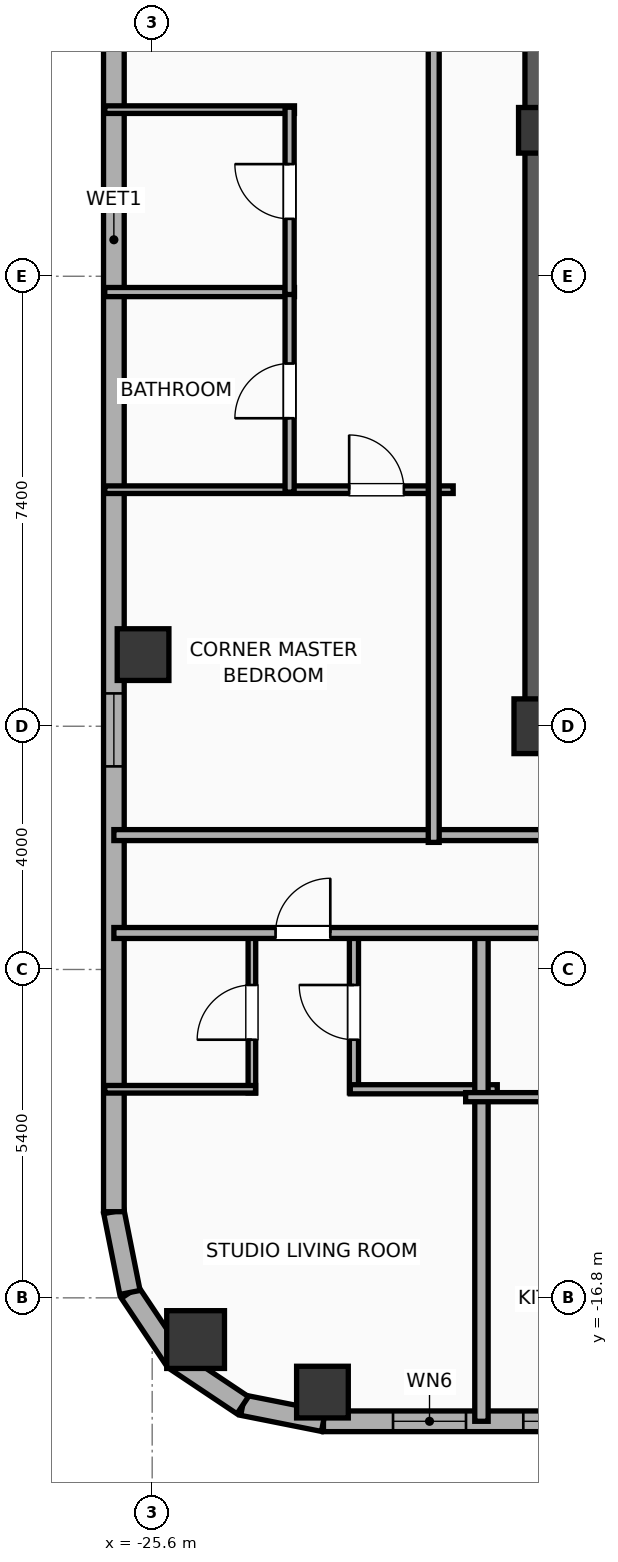
"""IFC4 building model, lengths in metres.
Left out: names, types, materials, properties, quantities, classifications, styles, units other than length and angle.
Written with IfcOpenShell. Run it as: python <this file> out.ifc"""

import sys

from ifc_helpers import new_model, si_unit, direction, frame, frame_2d, origin, origin_2d, place, context, subcontext, project, spatial, rectangle, hollow_rectangle, hollow_circle, extrude, element, fill, save


model = new_model("IFC4")
c1 = context("Model", 3, precision=1e-05, world=origin(), true_north=direction((0.0, 1.0)))
c2 = subcontext(c1, "Body", "Model", "MODEL_VIEW")
j1 = project(units=[si_unit("LENGTHUNIT", "METRE"), si_unit("PLANEANGLEUNIT", "RADIAN")], contexts=[c1])
p1 = place(None, origin())
s1 = spatial("IfcSite", under=j1, at=p1, CompositionType="ELEMENT")
p2 = place(p1, origin())
s2 = spatial("IfcBuilding", under=s1, at=p2, CompositionType="ELEMENT")
p3 = place(p2, frame((0.0, 0.0, 215.8)))
s3 = spatial("IfcBuildingStorey", under=s2, at=p3, CompositionType="ELEMENT", Elevation=215.8)
p4 = place(p3, frame((-19.2, -7.4, 0.0), z_axis=(0.0, 0.0, 1.0), x_axis=(1.0, 0.0, 0.0)))
e1 = element("IfcColumn", 1, at=p4, inside=s3, PredefinedType="COLUMN", context=c2, shape_type="SweptSolid", body=[
    extrude(rectangle(XDim=0.9, YDim=0.9, at=origin_2d()), origin(), (0.0, 0.0, 1.0), 3.9),
])
p5 = place(p3, frame((-19.2, 2.4, 0.0), z_axis=(0.0, 0.0, 1.0), x_axis=(1.0, 0.0, 0.0)))
e2 = element("IfcColumn", 2, at=p5, inside=s3, PredefinedType="COLUMN", context=c2, shape_type="SweptSolid", body=[
    extrude(rectangle(XDim=0.75, YDim=0.75, at=origin_2d()), origin(), (0.0, 0.0, 1.0), 3.9),
])
p6 = place(p3, frame((-19.425, -7.4, 0.0), z_axis=(0.0, 0.0, 1.0), x_axis=(1.0, 0.0, 0.0)))
e3 = element("IfcWall", 3, at=p6, inside=s3, PredefinedType="SHEAR", context=c2, shape_type="SweptSolid", body=[
    extrude(rectangle(XDim=7.25, YDim=0.45, at=frame_2d((3.625, 0.0))), origin(), (0.0, 0.0, 1.0), 3.65),
])
p7 = place(p3, frame((-19.145, -7.4, 0.0), z_axis=(0.0, 0.0, 1.0), x_axis=(0.0, 1.0, 0.0)))
e4 = element("IfcWall", 4, at=p7, inside=s3, PredefinedType="SHEAR", context=c2, shape_type="SweptSolid", body=[
    extrude(rectangle(XDim=14.8, YDim=0.65, at=frame_2d((7.4, 0.0))), origin(), (0.0, 0.0, 1.0), 3.65),
])
for number, where, z_axis, x_axis in (
    (5, (-22.8, -18.35, 0.0), (0.0, 0.0, 1.0), (1.0, 0.0, 0.0)),
    (6, (-25.75, -6.222, 0.0), (0.0, 0.0, 1.0), (1.0, 0.0, 0.0)),
):
    element("IfcColumn", number, at=place(p3, frame(where, z_axis=z_axis, x_axis=x_axis)), inside=s3, PredefinedType="COLUMN", context=c2, shape_type="SweptSolid", body=[
        extrude(hollow_rectangle(XDim=0.85, YDim=0.85, WallThickness=0.028, at=origin_2d()), origin(), (0.0, 0.0, 1.0), 3.9),
    ])
p8 = place(p3, frame((-24.886, -17.486, 0.0), z_axis=(0.0, 0.0, 1.0), x_axis=(1.0, 0.0, 0.0)))
e7 = element("IfcColumn", 7, at=p8, inside=s3, PredefinedType="COLUMN", context=c2, shape_type="SweptSolid", body=[
    extrude(hollow_circle(Radius=0.475, WallThickness=0.032, at=origin_2d()), origin(), (0.0, 0.0, 1.0), 3.9),
])
p9 = place(p3, frame((26.783, -18.83, 0.0), z_axis=(0.0, 0.0, 1.0), x_axis=(-1.0, 0.0, 0.0)))
e8 = element("IfcWall", 8, at=p9, inside=s3, PredefinedType="ELEMENTEDWALL", context=c2, shape_type="SweptSolid", body=[
    extrude(rectangle(XDim=49.566, YDim=0.34, at=frame_2d((24.783, 0.0))), origin(), (0.0, 0.0, 1.0), 3.65),
])
p10 = place(p9, frame((23.583, 0.0, 0.75)))
e9 = element("IfcOpeningElement", 9, at=p10, cuts=e8, PredefinedType="OPENING", context=c2, shape_type="SweptSolid", body=[
    extrude(rectangle(XDim=2.4, YDim=2.1, at=frame_2d((1.2, 1.05))), frame((0.0, 0.18, 0.0), z_axis=(0.0, -1.0, 0.0), x_axis=(1.0, 0.0, 0.0)), (0.0, 0.0, 1.0), 0.36),
])
p11 = place(p9, frame((41.756, 0.0, 0.75)))
e10 = element("IfcOpeningElement", 10, at=p11, cuts=e8, PredefinedType="OPENING", context=c2, shape_type="SweptSolid", body=[
    extrude(rectangle(XDim=2.4, YDim=2.1, at=frame_2d((1.2, 1.05))), frame((0.0, 0.18, 0.0), z_axis=(0.0, -1.0, 0.0), x_axis=(1.0, 0.0, 0.0)), (0.0, 0.0, 1.0), 0.36),
])
p12 = place(p9, frame((47.222, 0.0, 0.75)))
e11 = element("IfcOpeningElement", 11, at=p12, cuts=e8, PredefinedType="OPENING", context=c2, shape_type="SweptSolid", body=[
    extrude(rectangle(XDim=1.2, YDim=2.05, at=frame_2d((0.6, 1.025))), frame((0.0, 0.18, 0.0), z_axis=(0.0, -1.0, 0.0), x_axis=(1.0, 0.0, 0.0)), (0.0, 0.0, 1.0), 0.36),
])
p13 = place(p9, frame((45.08, 0.0, 0.75)))
e12 = element("IfcOpeningElement", 12, at=p13, cuts=e8, PredefinedType="OPENING", context=c2, shape_type="SweptSolid", body=[
    extrude(rectangle(XDim=1.2, YDim=2.05, at=frame_2d((0.6, 1.025))), frame((0.0, 0.18, 0.0), z_axis=(0.0, -1.0, 0.0), x_axis=(1.0, 0.0, 0.0)), (0.0, 0.0, 1.0), 0.36),
])
p14 = place(p9, frame((37.289, 0.0, 0.75)))
e13 = element("IfcOpeningElement", 13, at=p14, cuts=e8, PredefinedType="OPENING", context=c2, shape_type="SweptSolid", body=[
    extrude(rectangle(XDim=1.2, YDim=2.05, at=frame_2d((0.6, 1.025))), frame((0.0, 0.18, 0.0), z_axis=(0.0, -1.0, 0.0), x_axis=(1.0, 0.0, 0.0)), (0.0, 0.0, 1.0), 0.36),
])
p15 = place(p9, frame((16.115, 0.0, 0.75)))
e14 = element("IfcOpeningElement", 14, at=p15, cuts=e8, PredefinedType="OPENING", context=c2, shape_type="SweptSolid", body=[
    extrude(rectangle(XDim=1.2, YDim=2.05, at=frame_2d((0.6, 1.025))), frame((0.0, 0.18, 0.0), z_axis=(0.0, -1.0, 0.0), x_axis=(1.0, 0.0, 0.0)), (0.0, 0.0, 1.0), 0.36),
])
p16 = place(p9, frame((12.422, 0.0, 0.75)))
e15 = element("IfcOpeningElement", 15, at=p16, cuts=e8, PredefinedType="OPENING", context=c2, shape_type="SweptSolid", body=[
    extrude(rectangle(XDim=1.2, YDim=2.05, at=frame_2d((0.6, 1.025))), frame((0.0, 0.18, 0.0), z_axis=(0.0, -1.0, 0.0), x_axis=(1.0, 0.0, 0.0)), (0.0, 0.0, 1.0), 0.36),
])
p17 = place(p9, frame((8.09, 0.0, 0.75)))
e16 = element("IfcOpeningElement", 16, at=p17, cuts=e8, PredefinedType="OPENING", context=c2, shape_type="SweptSolid", body=[
    extrude(rectangle(XDim=1.2, YDim=2.05, at=frame_2d((0.6, 1.025))), frame((0.0, 0.18, 0.0), z_axis=(0.0, -1.0, 0.0), x_axis=(1.0, 0.0, 0.0)), (0.0, 0.0, 1.0), 0.36),
])
p18 = place(p9, frame((4.637, 0.0, 0.75)))
e17 = element("IfcOpeningElement", 17, at=p18, cuts=e8, PredefinedType="OPENING", context=c2, shape_type="SweptSolid", body=[
    extrude(rectangle(XDim=1.2, YDim=2.05, at=frame_2d((0.6, 1.025))), frame((0.0, 0.18, 0.0), z_axis=(0.0, -1.0, 0.0), x_axis=(1.0, 0.0, 0.0)), (0.0, 0.0, 1.0), 0.36),
])
p19 = place(p9, frame((1.811, 0.0, 0.75)))
e18 = element("IfcOpeningElement", 18, at=p19, cuts=e8, PredefinedType="OPENING", context=c2, shape_type="SweptSolid", body=[
    extrude(rectangle(XDim=1.2, YDim=2.05, at=frame_2d((0.6, 1.025))), frame((0.0, 0.18, 0.0), z_axis=(0.0, -1.0, 0.0), x_axis=(1.0, 0.0, 0.0)), (0.0, 0.0, 1.0), 0.36),
])
p20 = place(p9, frame((32.253, 0.0, 0.75)))
e19 = element("IfcOpeningElement", 19, at=p20, cuts=e8, PredefinedType="OPENING", context=c2, shape_type="SweptSolid", body=[
    extrude(rectangle(XDim=1.2, YDim=2.05, at=frame_2d((0.6, 1.025))), frame((0.0, 0.18, 0.0), z_axis=(0.0, -1.0, 0.0), x_axis=(1.0, 0.0, 0.0)), (0.0, 0.0, 1.0), 0.36),
])
p21 = place(p9, frame((27.853, 0.0, 0.75)))
e20 = element("IfcOpeningElement", 20, at=p21, cuts=e8, PredefinedType="OPENING", context=c2, shape_type="SweptSolid", body=[
    extrude(rectangle(XDim=1.2, YDim=2.05, at=frame_2d((0.6, 1.025))), frame((0.0, 0.18, 0.0), z_axis=(0.0, -1.0, 0.0), x_axis=(1.0, 0.0, 0.0)), (0.0, 0.0, 1.0), 0.36),
])
p22 = place(p9, frame((20.473, 0.0, 0.75)))
e21 = element("IfcOpeningElement", 21, at=p22, cuts=e8, PredefinedType="OPENING", context=c2, shape_type="SweptSolid", body=[
    extrude(rectangle(XDim=1.2, YDim=2.05, at=frame_2d((0.6, 1.025))), frame((0.0, 0.18, 0.0), z_axis=(0.0, -1.0, 0.0), x_axis=(1.0, 0.0, 0.0)), (0.0, 0.0, 1.0), 0.36),
])
p23 = place(p3, frame((-22.783, -18.83, 0.0), z_axis=(0.0, 0.0, 1.0), x_axis=(-0.980788153188, 0.195075878998, 0.0)))
e22 = element("IfcWall", 22, at=p23, inside=s3, PredefinedType="ELEMENTEDWALL", context=c2, shape_type="SweptSolid", body=[
    extrude(rectangle(XDim=1.354, YDim=0.34, at=frame_2d((0.677, 0.0))), origin(), (0.0, 0.0, 1.0), 3.65),
])
p24 = place(p3, frame((-24.111, -18.566, 0.0), z_axis=(0.0, 0.0, 1.0), x_axis=(-0.831403586725, 0.555669034571, 0.0)))
e23 = element("IfcWall", 23, at=p24, inside=s3, PredefinedType="ELEMENTEDWALL", context=c2, shape_type="SweptSolid", body=[
    extrude(rectangle(XDim=1.337, YDim=0.34, at=frame_2d((0.668, 0.0))), origin(), (0.0, 0.0, 1.0), 3.65),
])
p25 = place(p3, frame((-25.223, -17.823, 0.0), z_axis=(0.0, 0.0, 1.0), x_axis=(-0.555584683399, 0.831459956686, 0.0)))
e24 = element("IfcWall", 24, at=p25, inside=s3, PredefinedType="ELEMENTEDWALL", context=c2, shape_type="SweptSolid", body=[
    extrude(rectangle(XDim=1.337, YDim=0.34, at=frame_2d((0.668, 0.0))), origin(), (0.0, 0.0, 1.0), 3.65),
])
p26 = place(p3, frame((-25.966, -16.711, 0.0), z_axis=(0.0, 0.0, 1.0), x_axis=(-0.195110379894, 0.98078129043, 0.0)))
e25 = element("IfcWall", 25, at=p26, inside=s3, PredefinedType="ELEMENTEDWALL", context=c2, shape_type="SweptSolid", body=[
    extrude(rectangle(XDim=1.354, YDim=0.34, at=frame_2d((0.677, 0.0))), origin(), (0.0, 0.0, 1.0), 3.65),
])
p27 = place(p3, frame((-26.23, -15.383, 0.0), z_axis=(0.0, 0.0, 1.0), x_axis=(0.0, 1.0, 0.0)))
e26 = element("IfcWall", 26, at=p27, inside=s3, PredefinedType="ELEMENTEDWALL", context=c2, shape_type="SweptSolid", body=[
    extrude(rectangle(XDim=31.967, YDim=0.34, at=frame_2d((15.983, 0.0))), origin(), (0.0, 0.0, 1.0), 3.65),
])
p28 = place(p27, frame((29.55, 0.0, 0.75)))
e27 = element("IfcOpeningElement", 27, at=p28, cuts=e26, PredefinedType="OPENING", context=c2, shape_type="SweptSolid", body=[
    extrude(rectangle(XDim=1.2, YDim=2.05, at=frame_2d((0.6, 1.025))), frame((0.0, 0.18, 0.0), z_axis=(0.0, -1.0, 0.0), x_axis=(1.0, 0.0, 0.0)), (0.0, 0.0, 1.0), 0.36),
])
p29 = place(p27, frame((20.778, 0.0, 0.75)))
e28 = element("IfcOpeningElement", 28, at=p29, cuts=e26, PredefinedType="OPENING", context=c2, shape_type="SweptSolid", body=[
    extrude(rectangle(XDim=1.2, YDim=2.05, at=frame_2d((0.6, 1.025))), frame((0.0, 0.18, 0.0), z_axis=(0.0, -1.0, 0.0), x_axis=(1.0, 0.0, 0.0)), (0.0, 0.0, 1.0), 0.36),
])
p30 = place(p27, frame((7.323, 0.0, 0.75)))
e29 = element("IfcOpeningElement", 29, at=p30, cuts=e26, PredefinedType="OPENING", context=c2, shape_type="SweptSolid", body=[
    extrude(rectangle(XDim=1.2, YDim=2.05, at=frame_2d((0.6, 1.025))), frame((0.0, 0.18, 0.0), z_axis=(0.0, -1.0, 0.0), x_axis=(1.0, 0.0, 0.0)), (0.0, 0.0, 1.0), 0.36),
])
p31 = place(p3, frame((-26.23, -9.19, 0.0), z_axis=(0.0, 0.0, 1.0), x_axis=(1.0, 0.0, 0.0)))
e30 = element("IfcWall", 30, at=p31, inside=s3, PredefinedType="PARTITIONING", context=c2, shape_type="SweptSolid", body=[
    extrude(rectangle(XDim=16.35, YDim=0.18, at=frame_2d((8.175, 0.0))), origin(), (0.0, 0.0, 1.0), 3.65),
])
p32 = place(p3, frame((-23.96, -13.43, 0.0), z_axis=(0.0, 0.0, 1.0), x_axis=(0.0, 1.0, 0.0)))
e31 = element("IfcWall", 31, at=p32, inside=s3, PredefinedType="PARTITIONING", context=c2, shape_type="SweptSolid", body=[
    extrude(rectangle(XDim=2.65, YDim=0.125, at=frame_2d((1.325, 0.0))), origin(), (0.0, 0.0, 1.0), 3.65),
])
p33 = place(p32, frame((0.875, 0.0, 0.0)))
e32 = element("IfcOpeningElement", 32, at=p33, cuts=e31, PredefinedType="OPENING", context=c2, shape_type="SweptSolid", body=[
    extrude(rectangle(XDim=0.9, YDim=2.05, at=frame_2d((0.45, 1.025))), frame((0.0, 0.073, 0.0), z_axis=(0.0, -1.0, 0.0), x_axis=(1.0, 0.0, 0.0)), (0.0, 0.0, 1.0), 0.145),
])
p34 = place(p3, frame((-22.282, -13.43, 0.0), z_axis=(0.0, 0.0, 1.0), x_axis=(0.0, 1.0, 0.0)))
e33 = element("IfcWall", 33, at=p34, inside=s3, PredefinedType="PLUMBINGWALL", context=c2, shape_type="SweptSolid", body=[
    extrude(rectangle(XDim=2.65, YDim=0.15, at=frame_2d((1.325, 0.0))), origin(), (0.0, 0.0, 1.0), 3.65),
])
p35 = place(p34, frame((0.875, 0.0, 0.0)))
e34 = element("IfcOpeningElement", 34, at=p35, cuts=e33, PredefinedType="OPENING", context=c2, shape_type="SweptSolid", body=[
    extrude(rectangle(XDim=0.9, YDim=2.05, at=frame_2d((0.45, 1.025))), frame((0.0, 0.085, 0.0), z_axis=(0.0, -1.0, 0.0), x_axis=(1.0, 0.0, 0.0)), (0.0, 0.0, 1.0), 0.17),
])
p36 = place(p3, frame((-26.38, -13.37, 0.0), z_axis=(0.0, 0.0, 1.0), x_axis=(1.0, 0.0, 0.0)))
e35 = element("IfcWall", 35, at=p36, inside=s3, PredefinedType="PARTITIONING", context=c2, shape_type="SweptSolid", body=[
    extrude(rectangle(XDim=2.48, YDim=0.125, at=frame_2d((1.24, 0.0))), origin(), (0.0, 0.0, 1.0), 3.65),
])
p37 = place(p3, frame((-22.342, -13.37, 0.0), z_axis=(0.0, 0.0, 1.0), x_axis=(1.0, 0.0, 0.0)))
e36 = element("IfcWall", 36, at=p37, inside=s3, PredefinedType="PLUMBINGWALL", context=c2, shape_type="SweptSolid", body=[
    extrude(rectangle(XDim=2.417, YDim=0.15, at=frame_2d((1.208, 0.0))), origin(), (0.0, 0.0, 1.0), 3.65),
])
p38 = place(p3, frame((-20.185, -18.83, 0.0), z_axis=(0.0, 0.0, 1.0), x_axis=(0.0, 1.0, 0.0)))
e37 = element("IfcWall", 37, at=p38, inside=s3, PredefinedType="PARTITIONING", context=c2, shape_type="SweptSolid", body=[
    extrude(rectangle(XDim=8.11, YDim=0.22, at=frame_2d((4.055, 0.0))), origin(), (0.0, 0.0, 1.0), 3.09),
])
p39 = place(p3, frame((-20.445, -13.5, 0.0), z_axis=(0.0, 0.0, 1.0), x_axis=(1.0, 0.0, 0.0)))
e38 = element("IfcWall", 38, at=p39, inside=s3, PredefinedType="PLUMBINGWALL", context=c2, shape_type="SweptSolid", body=[
    extrude(rectangle(XDim=2.916, YDim=0.15, at=frame_2d((1.458, 0.0))), origin(), (0.0, 0.0, 1.0), 3.65),
])
p40 = place(p3, frame((-26.23, -10.8, 0.0), z_axis=(0.0, 0.0, 1.0), x_axis=(1.0, 0.0, 0.0)))
e39 = element("IfcWall", 39, at=p40, inside=s3, PredefinedType="PARTITIONING", context=c2, shape_type="SweptSolid", body=[
    extrude(rectangle(XDim=18.15, YDim=0.18, at=frame_2d((9.075, 0.0))), origin(), (0.0, 0.0, 1.0), 3.65),
])
p41 = place(p40, frame((2.659, 0.0, 0.0)))
e40 = element("IfcOpeningElement", 40, at=p41, cuts=e39, PredefinedType="OPENING", context=c2, shape_type="SweptSolid", body=[
    extrude(rectangle(XDim=0.9, YDim=2.05, at=frame_2d((0.45, 1.025))), frame((0.0, 0.1, 0.0), z_axis=(0.0, -1.0, 0.0), x_axis=(1.0, 0.0, 0.0)), (0.0, 0.0, 1.0), 0.2),
])
p42 = place(p40, frame((9.754, 0.0, 0.0)))
e41 = element("IfcOpeningElement", 41, at=p42, cuts=e39, PredefinedType="OPENING", context=c2, shape_type="SweptSolid", body=[
    extrude(rectangle(XDim=1.15, YDim=2.05, at=frame_2d((0.575, 1.025))), frame((0.0, 0.1, 0.0), z_axis=(0.0, -1.0, 0.0), x_axis=(1.0, 0.0, 0.0)), (0.0, 0.0, 1.0), 0.2),
])
p43 = place(p40, frame((14.792, 0.0, 0.0)))
e42 = element("IfcOpeningElement", 42, at=p43, cuts=e39, PredefinedType="OPENING", context=c2, shape_type="SweptSolid", body=[
    extrude(rectangle(XDim=0.9, YDim=2.05, at=frame_2d((0.45, 1.025))), frame((0.0, 0.1, 0.0), z_axis=(0.0, -1.0, 0.0), x_axis=(1.0, 0.0, 0.0)), (0.0, 0.0, 1.0), 0.2),
])
p44 = place(p3, frame((-26.38, 2.74, 0.0), z_axis=(0.0, 0.0, 1.0), x_axis=(1.0, 0.0, 0.0)))
e43 = element("IfcWall", 43, at=p44, inside=s3, PredefinedType="PARTITIONING", context=c2, shape_type="SweptSolid", body=[
    extrude(rectangle(XDim=3.12, YDim=0.125, at=frame_2d((1.56, 0.0))), origin(), (0.0, 0.0, 1.0), 3.65),
])
p45 = place(p3, frame((-26.38, -0.26, 0.0), z_axis=(0.0, 0.0, 1.0), x_axis=(1.0, 0.0, 0.0)))
e44 = element("IfcWall", 44, at=p45, inside=s3, PredefinedType="PLUMBINGWALL", context=c2, shape_type="SweptSolid", body=[
    extrude(rectangle(XDim=3.12, YDim=0.15, at=frame_2d((1.56, 0.0))), origin(), (0.0, 0.0, 1.0), 3.65),
])
p46 = place(p3, frame((-26.38, -3.51, 0.0), z_axis=(0.0, 0.0, 1.0), x_axis=(1.0, 0.0, 0.0)))
e45 = element("IfcWall", 45, at=p46, inside=s3, PredefinedType="PARTITIONING", context=c2, shape_type="SweptSolid", body=[
    extrude(rectangle(XDim=5.73, YDim=0.125, at=frame_2d((2.865, 0.0))), origin(), (0.0, 0.0, 1.0), 3.65),
])
p47 = place(p46, frame((4.019, 0.0, 0.0)))
e46 = element("IfcOpeningElement", 46, at=p47, cuts=e45, PredefinedType="OPENING", context=c2, shape_type="SweptSolid", body=[
    extrude(rectangle(XDim=0.9, YDim=2.05, at=frame_2d((0.45, 1.025))), frame((0.0, 0.073, 0.0), z_axis=(0.0, -1.0, 0.0), x_axis=(1.0, 0.0, 0.0)), (0.0, 0.0, 1.0), 0.145),
])
p48 = place(p3, frame((-23.34, -3.55, 0.0), z_axis=(0.0, 0.0, 1.0), x_axis=(0.0, 1.0, 0.0)))
e47 = element("IfcWall", 47, at=p48, inside=s3, PredefinedType="PLUMBINGWALL", context=c2, shape_type="SweptSolid", body=[
    extrude(rectangle(XDim=3.33, YDim=0.15, at=frame_2d((1.665, 0.0))), origin(), (0.0, 0.0, 1.0), 3.65),
])
p49 = place(p48, frame((1.215, 0.0, 0.0)))
e48 = element("IfcOpeningElement", 48, at=p49, cuts=e47, PredefinedType="OPENING", context=c2, shape_type="SweptSolid", body=[
    extrude(rectangle(XDim=0.9, YDim=2.05, at=frame_2d((0.45, 1.025))), frame((0.0, 0.085, 0.0), z_axis=(0.0, -1.0, 0.0), x_axis=(1.0, 0.0, 0.0)), (0.0, 0.0, 1.0), 0.17),
])
p50 = place(p3, frame((-23.34, -0.3, 0.0), z_axis=(0.0, 0.0, 1.0), x_axis=(0.0, 1.0, 0.0)))
e49 = element("IfcWall", 49, at=p50, inside=s3, PredefinedType="PLUMBINGWALL", context=c2, shape_type="SweptSolid", body=[
    extrude(rectangle(XDim=3.08, YDim=0.15, at=frame_2d((1.54, 0.0))), origin(), (0.0, 0.0, 1.0), 3.65),
])
p51 = place(p50, frame((1.244, 0.0, 0.0)))
e50 = element("IfcOpeningElement", 50, at=p51, cuts=e49, PredefinedType="OPENING", context=c2, shape_type="SweptSolid", body=[
    extrude(rectangle(XDim=0.9, YDim=2.05, at=frame_2d((0.45, 1.025))), frame((0.0, 0.085, 0.0), z_axis=(0.0, -1.0, 0.0), x_axis=(1.0, 0.0, 0.0)), (0.0, 0.0, 1.0), 0.17),
])
p52 = place(p3, frame((-20.97, -9.31, 0.0), z_axis=(0.0, 0.0, 1.0), x_axis=(0.0, 1.0, 0.0)))
e51 = element("IfcWall", 51, at=p52, inside=s3, PredefinedType="PARTITIONING", context=c2, shape_type="SweptSolid", body=[
    extrude(rectangle(XDim=18.62, YDim=0.18, at=frame_2d((9.31, 0.0))), origin(), (0.0, 0.0, 1.0), 3.65),
])
p53 = place(p12, origin())
e52 = element("IfcWindow", 52, at=p53, inside=s3, PartitioningType="SINGLE_PANEL", PredefinedType="WINDOW", context=c2, shape_type="SweptSolid", body=[
    extrude(rectangle(XDim=1.2, YDim=2.05, at=frame_2d((0.6, 1.025))), frame((0.0, 0.03, 0.0), z_axis=(0.0, -1.0, 0.0), x_axis=(1.0, 0.0, 0.0)), (0.0, 0.0, 1.0), 0.06),
])
fill(e11, e52)
p54 = place(p13, origin())
e53 = element("IfcWindow", 53, at=p54, inside=s3, PartitioningType="SINGLE_PANEL", PredefinedType="WINDOW", context=c2, shape_type="SweptSolid", body=[
    extrude(rectangle(XDim=1.2, YDim=2.05, at=frame_2d((0.6, 1.025))), frame((0.0, 0.03, 0.0), z_axis=(0.0, -1.0, 0.0), x_axis=(1.0, 0.0, 0.0)), (0.0, 0.0, 1.0), 0.06),
])
fill(e12, e53)
p55 = place(p30, origin())
e54 = element("IfcWindow", 54, at=p55, inside=s3, PartitioningType="SINGLE_PANEL", PredefinedType="WINDOW", context=c2, shape_type="SweptSolid", body=[
    extrude(rectangle(XDim=1.2, YDim=2.05, at=frame_2d((0.6, 1.025))), frame((0.0, 0.03, 0.0), z_axis=(0.0, -1.0, 0.0), x_axis=(1.0, 0.0, 0.0)), (0.0, 0.0, 1.0), 0.06),
])
fill(e29, e54)
p56 = place(p33, origin())
e55 = element("IfcDoor", 55, at=p56, inside=s3, OperationType="SINGLE_SWING_LEFT", PredefinedType="DOOR", context=c2, shape_type="SweptSolid", body=[
    extrude(rectangle(XDim=0.9, YDim=2.05, at=frame_2d((0.45, 1.025))), frame((0.0, 0.025, 0.0), z_axis=(0.0, -1.0, 0.0), x_axis=(1.0, 0.0, 0.0)), (0.0, 0.0, 1.0), 0.05),
])
fill(e32, e55)
p57 = place(p35, origin())
e56 = element("IfcDoor", 56, at=p57, inside=s3, OperationType="SINGLE_SWING_RIGHT", PredefinedType="DOOR", context=c2, shape_type="SweptSolid", body=[
    extrude(rectangle(XDim=0.9, YDim=2.05, at=frame_2d((0.45, 1.025))), frame((0.0, 0.025, 0.0), z_axis=(0.0, -1.0, 0.0), x_axis=(1.0, 0.0, 0.0)), (0.0, 0.0, 1.0), 0.05),
])
fill(e34, e56)
p58 = place(p41, origin())
e57 = element("IfcDoor", 57, at=p58, inside=s3, OperationType="SINGLE_SWING_RIGHT", PredefinedType="DOOR", context=c2, shape_type="SweptSolid", body=[
    extrude(rectangle(XDim=0.9, YDim=2.05, at=frame_2d((0.45, 1.025))), frame((0.0, 0.025, 0.0), z_axis=(0.0, -1.0, 0.0), x_axis=(1.0, 0.0, 0.0)), (0.0, 0.0, 1.0), 0.05),
])
fill(e40, e57)
p59 = place(p47, origin())
e58 = element("IfcDoor", 58, at=p59, inside=s3, OperationType="SINGLE_SWING_LEFT", PredefinedType="DOOR", context=c2, shape_type="SweptSolid", body=[
    extrude(rectangle(XDim=0.9, YDim=2.05, at=frame_2d((0.45, 1.025))), frame((0.0, 0.025, 0.0), z_axis=(0.0, -1.0, 0.0), x_axis=(1.0, 0.0, 0.0)), (0.0, 0.0, 1.0), 0.05),
])
fill(e46, e58)
p60 = place(p49, origin())
e59 = element("IfcDoor", 59, at=p60, inside=s3, OperationType="SINGLE_SWING_LEFT", PredefinedType="DOOR", context=c2, shape_type="SweptSolid", body=[
    extrude(rectangle(XDim=0.9, YDim=2.05, at=frame_2d((0.45, 1.025))), frame((0.0, 0.025, 0.0), z_axis=(0.0, -1.0, 0.0), x_axis=(1.0, 0.0, 0.0)), (0.0, 0.0, 1.0), 0.05),
])
fill(e48, e59)
p61 = place(p51, origin())
e60 = element("IfcDoor", 60, at=p61, inside=s3, OperationType="SINGLE_SWING_RIGHT", PredefinedType="DOOR", context=c2, shape_type="SweptSolid", body=[
    extrude(rectangle(XDim=0.9, YDim=2.05, at=frame_2d((0.45, 1.025))), frame((0.0, 0.025, 0.0), z_axis=(0.0, -1.0, 0.0), x_axis=(1.0, 0.0, 0.0)), (0.0, 0.0, 1.0), 0.05),
])
fill(e50, e60)
save(model, sys.argv[1])
